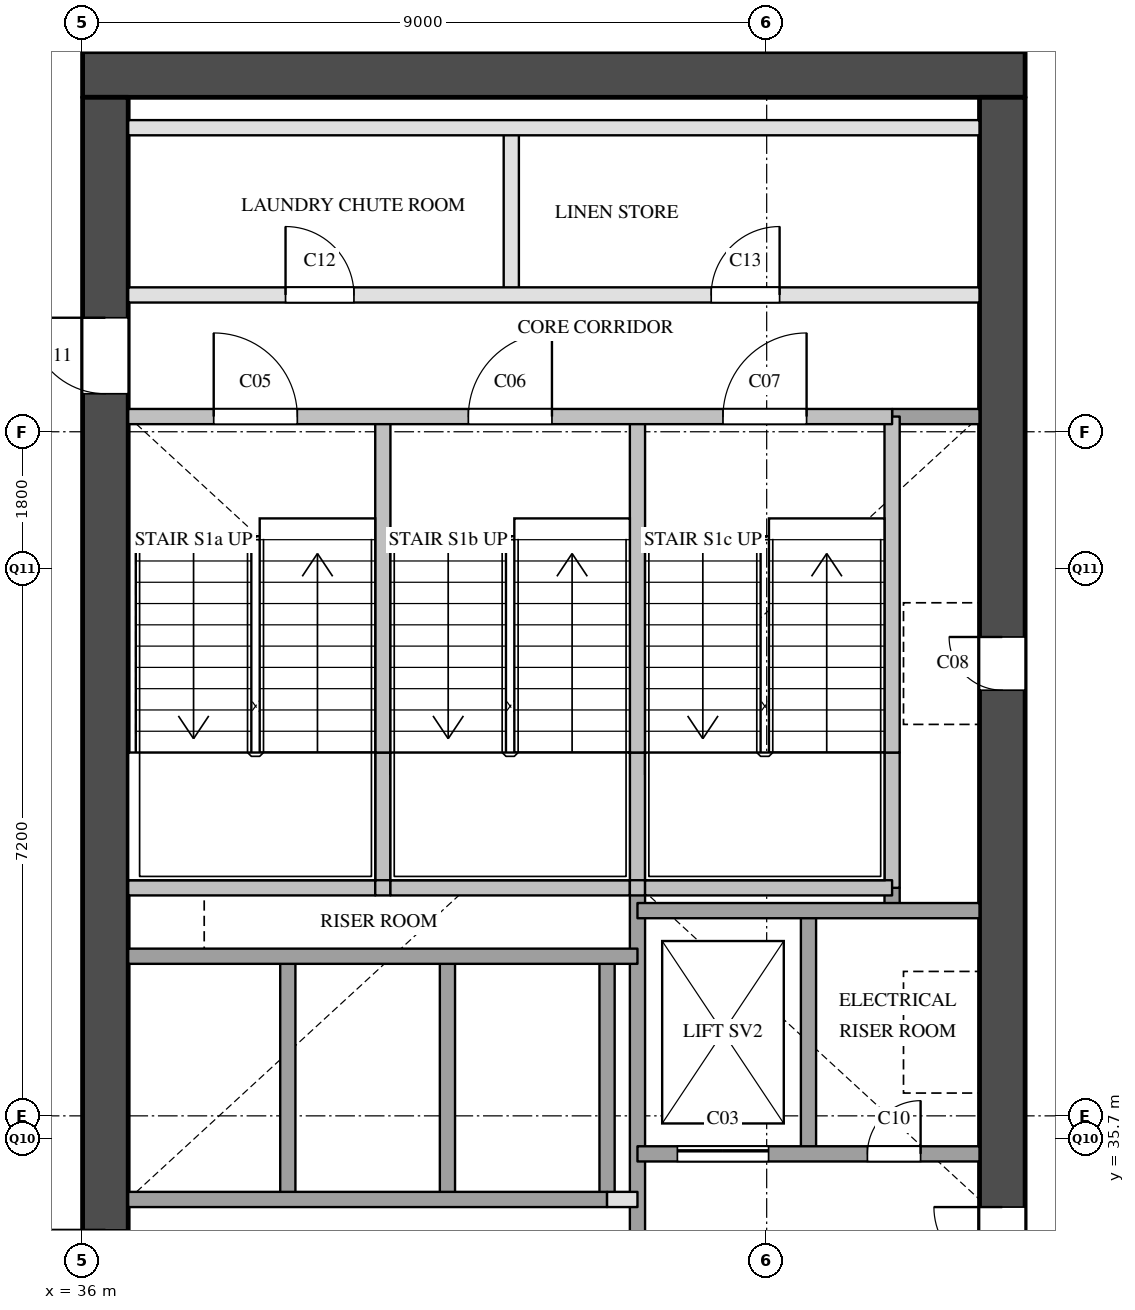
"""IFC4 building model, lengths in metres.
Left out: names, types, materials, properties, quantities, classifications, styles, units other than length and angle.
Written with IfcOpenShell. Run it as: python <this file> out.ifc"""

import sys

from ifc_helpers import new_model, si_unit, direction, frame, frame_2d, origin, place, context, subcontext, project, spatial, rectangle, extrude, element, fill, save


model = new_model("IFC4")
c1 = context("Model", 3, precision=1e-05, world=origin(), true_north=direction((0.0, 1.0)))
c2 = subcontext(c1, "Body", "Model", "MODEL_VIEW")
j1 = project(units=[si_unit("LENGTHUNIT", "METRE"), si_unit("PLANEANGLEUNIT", "RADIAN")], contexts=[c1])
p1 = place(None, origin())
s1 = spatial("IfcSite", under=j1, at=p1, CompositionType="ELEMENT")
p2 = place(p1, origin())
s2 = spatial("IfcBuilding", under=s1, at=p2, CompositionType="ELEMENT")
p3 = place(p2, frame((0.0, 0.0, 69.0)))
s3 = spatial("IfcBuildingStorey", under=s2, at=p3, CompositionType="ELEMENT", Elevation=69.0)
p4 = place(p3, frame((36.0, 49.7, 0.0), z_axis=(0.0, 0.0, 1.0), x_axis=(1.0, 0.0, 0.0)))
e1 = element("IfcWall", 1, at=p4, inside=s3, PredefinedType="SHEAR", context=c2, shape_type="SweptSolid", body=[
    extrude(rectangle(XDim=12.4, YDim=0.6, at=frame_2d((6.2, 0.0))), origin(), (0.0, 0.0, 1.0), 3.5),
])
p5 = place(p3, frame((36.3, 29.1, 0.0), z_axis=(0.0, 0.0, 1.0), x_axis=(0.0, 1.0, 0.0)))
e2 = element("IfcWall", 2, at=p5, inside=s3, PredefinedType="SHEAR", context=c2, shape_type="SweptSolid", body=[
    extrude(rectangle(XDim=20.3, YDim=0.6, at=frame_2d((10.15, 0.0))), origin(), (0.0, 0.0, 1.0), 3.5),
])
p6 = place(p5, frame((3.6, 0.0, 0.0)))
e3 = element("IfcOpeningElement", 3, at=p6, cuts=e2, PredefinedType="OPENING", context=c2, shape_type="SweptSolid", body=[
    extrude(rectangle(XDim=1.8, YDim=2.1, at=frame_2d((0.9, 1.05))), frame((0.0, 0.31, 0.0), z_axis=(0.0, -1.0, 0.0), x_axis=(1.0, 0.0, 0.0)), (0.0, 0.0, 1.0), 0.62),
])
p7 = place(p5, frame((16.4, 0.0, 0.0)))
e4 = element("IfcOpeningElement", 4, at=p7, cuts=e2, PredefinedType="OPENING", context=c2, shape_type="SweptSolid", body=[
    extrude(rectangle(XDim=1.0, YDim=2.1, at=frame_2d((0.5, 1.05))), frame((0.0, 0.31, 0.0), z_axis=(0.0, -1.0, 0.0), x_axis=(1.0, 0.0, 0.0)), (0.0, 0.0, 1.0), 0.62),
])
p8 = place(p3, frame((48.1, 29.1, 0.0), z_axis=(0.0, 0.0, 1.0), x_axis=(0.0, 1.0, 0.0)))
e5 = element("IfcWall", 5, at=p8, inside=s3, PredefinedType="SHEAR", context=c2, shape_type="SweptSolid", body=[
    extrude(rectangle(XDim=20.3, YDim=0.6, at=frame_2d((10.15, 0.0))), origin(), (0.0, 0.0, 1.0), 3.5),
])
p9 = place(p8, frame((12.5, 0.0, 0.0)))
e6 = element("IfcOpeningElement", 6, at=p9, cuts=e5, PredefinedType="OPENING", context=c2, shape_type="SweptSolid", body=[
    extrude(rectangle(XDim=0.7, YDim=2.1, at=frame_2d((0.35, 1.05))), frame((0.0, 0.31, 0.0), z_axis=(0.0, -1.0, 0.0), x_axis=(1.0, 0.0, 0.0)), (0.0, 0.0, 1.0), 0.62),
])
p10 = place(p8, frame((3.9, 0.0, 0.0)))
e7 = element("IfcOpeningElement", 7, at=p10, cuts=e5, PredefinedType="OPENING", context=c2, shape_type="SweptSolid", body=[
    extrude(rectangle(XDim=1.8, YDim=2.1, at=frame_2d((0.9, 1.05))), frame((0.0, 0.31, 0.0), z_axis=(0.0, -1.0, 0.0), x_axis=(1.0, 0.0, 0.0)), (0.0, 0.0, 1.0), 0.62),
])
p11 = place(p3, frame((38.7, 34.9, 0.0), z_axis=(0.0, 0.0, 1.0), x_axis=(0.0, 1.0, 0.0)))
e8 = element("IfcWall", 8, at=p11, inside=s3, PredefinedType="SOLIDWALL", context=c2, shape_type="SweptSolid", body=[
    extrude(rectangle(XDim=3.2, YDim=0.2, at=frame_2d((1.6, 0.0))), origin(), (0.0, 0.0, 1.0), 3.5),
])
p12 = place(p3, frame((39.95, 39.0, 0.0), z_axis=(0.0, 0.0, 1.0), x_axis=(0.0, 1.0, 0.0)))
e9 = element("IfcWall", 9, at=p12, inside=s3, PredefinedType="SOLIDWALL", context=c2, shape_type="SweptSolid", body=[
    extrude(rectangle(XDim=1.78, YDim=0.2, at=frame_2d((0.89, 0.0))), origin(), (0.0, 0.0, 1.0), 3.5),
])
p13 = place(p3, frame((39.95, 40.78, 0.0), z_axis=(0.0, 0.0, 1.0), x_axis=(0.0, 1.0, 0.0)))
e10 = element("IfcWall", 10, at=p13, inside=s3, PredefinedType="SOLIDWALL", context=c2, shape_type="SweptSolid", body=[
    extrude(rectangle(XDim=4.42, YDim=0.2, at=frame_2d((2.21, 0.0))), origin(), (0.0, 0.0, 1.0), 3.5),
])
p14 = place(p3, frame((40.8, 34.9, 0.0), z_axis=(0.0, 0.0, 1.0), x_axis=(0.0, 1.0, 0.0)))
e11 = element("IfcWall", 11, at=p14, inside=s3, PredefinedType="SOLIDWALL", context=c2, shape_type="SweptSolid", body=[
    extrude(rectangle(XDim=3.2, YDim=0.2, at=frame_2d((1.6, 0.0))), origin(), (0.0, 0.0, 1.0), 3.5),
])
p15 = place(p3, frame((41.64, 46.8, 0.0), z_axis=(0.0, 0.0, 1.0), x_axis=(0.0, 1.0, 0.0)))
e12 = element("IfcWall", 12, at=p15, inside=s3, PredefinedType="PARTITIONING", context=c2, shape_type="SweptSolid", body=[
    extrude(rectangle(XDim=2.2, YDim=0.2, at=frame_2d((1.1, 0.0))), origin(), (0.0, 0.0, 1.0), 3.5),
])
p16 = place(p3, frame((42.9, 34.9, 0.0), z_axis=(0.0, 0.0, 1.0), x_axis=(0.0, 1.0, 0.0)))
e13 = element("IfcWall", 13, at=p16, inside=s3, PredefinedType="SOLIDWALL", context=c2, shape_type="SweptSolid", body=[
    extrude(rectangle(XDim=3.2, YDim=0.2, at=frame_2d((1.6, 0.0))), origin(), (0.0, 0.0, 1.0), 3.5),
])
p17 = place(p3, frame((43.3, 29.1, 0.0), z_axis=(0.0, 0.0, 1.0), x_axis=(0.0, 1.0, 0.0)))
e14 = element("IfcWall", 14, at=p17, inside=s3, PredefinedType="SOLIDWALL", context=c2, shape_type="SweptSolid", body=[
    extrude(rectangle(XDim=9.9, YDim=0.2, at=frame_2d((4.95, 0.0))), origin(), (0.0, 0.0, 1.0), 3.5),
])
p18 = place(p3, frame((43.3, 39.0, 0.0), z_axis=(0.0, 0.0, 1.0), x_axis=(0.0, 1.0, 0.0)))
e15 = element("IfcWall", 15, at=p18, inside=s3, PredefinedType="SOLIDWALL", context=c2, shape_type="SweptSolid", body=[
    extrude(rectangle(XDim=1.78, YDim=0.2, at=frame_2d((0.89, 0.0))), origin(), (0.0, 0.0, 1.0), 3.5),
])
p19 = place(p3, frame((43.3, 40.78, 0.0), z_axis=(0.0, 0.0, 1.0), x_axis=(0.0, 1.0, 0.0)))
e16 = element("IfcWall", 16, at=p19, inside=s3, PredefinedType="SOLIDWALL", context=c2, shape_type="SweptSolid", body=[
    extrude(rectangle(XDim=4.42, YDim=0.2, at=frame_2d((2.21, 0.0))), origin(), (0.0, 0.0, 1.0), 3.5),
])
p20 = place(p3, frame((45.55, 35.5, 0.0), z_axis=(0.0, 0.0, 1.0), x_axis=(0.0, 1.0, 0.0)))
e17 = element("IfcWall", 17, at=p20, inside=s3, PredefinedType="SOLIDWALL", context=c2, shape_type="SweptSolid", body=[
    extrude(rectangle(XDim=3.2, YDim=0.2, at=frame_2d((1.6, 0.0))), origin(), (0.0, 0.0, 1.0), 3.5),
])
p21 = place(p3, frame((46.65, 38.7, 0.0), z_axis=(0.0, 0.0, 1.0), x_axis=(0.0, 1.0, 0.0)))
e18 = element("IfcWall", 18, at=p21, inside=s3, PredefinedType="SOLIDWALL", context=c2, shape_type="SweptSolid", body=[
    extrude(rectangle(XDim=0.3, YDim=0.2, at=frame_2d((0.15, 0.0))), origin(), (0.0, 0.0, 1.0), 3.5),
])
p22 = place(p3, frame((46.65, 39.0, 0.0), z_axis=(0.0, 0.0, 1.0), x_axis=(0.0, 1.0, 0.0)))
e19 = element("IfcWall", 19, at=p22, inside=s3, PredefinedType="SOLIDWALL", context=c2, shape_type="SweptSolid", body=[
    extrude(rectangle(XDim=1.78, YDim=0.2, at=frame_2d((0.89, 0.0))), origin(), (0.0, 0.0, 1.0), 3.5),
])
p23 = place(p3, frame((46.65, 40.78, 0.0), z_axis=(0.0, 0.0, 1.0), x_axis=(0.0, 1.0, 0.0)))
e20 = element("IfcWall", 20, at=p23, inside=s3, PredefinedType="SOLIDWALL", context=c2, shape_type="SweptSolid", body=[
    extrude(rectangle(XDim=4.42, YDim=0.2, at=frame_2d((2.21, 0.0))), origin(), (0.0, 0.0, 1.0), 3.5),
])
p24 = place(p3, frame((42.9, 34.9, 0.0), z_axis=(0.0, 0.0, 1.0), x_axis=(1.0, 0.0, 0.0)))
e21 = element("IfcWall", 21, at=p24, inside=s3, PredefinedType="PARTITIONING", context=c2, shape_type="SweptSolid", body=[
    extrude(rectangle(XDim=0.4, YDim=0.2, at=frame_2d((0.2, 0.0))), origin(), (0.0, 0.0, 1.0), 3.5),
])
p25 = place(p3, frame((36.6, 34.9, 0.0), z_axis=(0.0, 0.0, 1.0), x_axis=(1.0, 0.0, 0.0)))
e22 = element("IfcWall", 22, at=p25, inside=s3, PredefinedType="SOLIDWALL", context=c2, shape_type="SweptSolid", body=[
    extrude(rectangle(XDim=6.3, YDim=0.2, at=frame_2d((3.15, 0.0))), origin(), (0.0, 0.0, 1.0), 3.5),
])
p26 = place(p3, frame((43.3, 35.5, 0.0), z_axis=(0.0, 0.0, 1.0), x_axis=(1.0, 0.0, 0.0)))
e23 = element("IfcWall", 23, at=p26, inside=s3, PredefinedType="SOLIDWALL", context=c2, shape_type="SweptSolid", body=[
    extrude(rectangle(XDim=4.5, YDim=0.2, at=frame_2d((2.25, 0.0))), origin(), (0.0, 0.0, 1.0), 3.5),
])
p27 = place(p26, frame((0.525, 0.0, 0.0)))
e24 = element("IfcOpeningElement", 24, at=p27, cuts=e23, PredefinedType="OPENING", context=c2, shape_type="SweptSolid", body=[
    extrude(rectangle(XDim=1.2, YDim=2.1, at=frame_2d((0.6, 1.05))), frame((0.0, 0.11, 0.0), z_axis=(0.0, -1.0, 0.0), x_axis=(1.0, 0.0, 0.0)), (0.0, 0.0, 1.0), 0.22),
])
p28 = place(p26, frame((3.025, 0.0, 0.0)))
e25 = element("IfcOpeningElement", 25, at=p28, cuts=e23, PredefinedType="OPENING", context=c2, shape_type="SweptSolid", body=[
    extrude(rectangle(XDim=0.7, YDim=2.1, at=frame_2d((0.35, 1.05))), frame((0.0, 0.11, 0.0), z_axis=(0.0, -1.0, 0.0), x_axis=(1.0, 0.0, 0.0)), (0.0, 0.0, 1.0), 0.22),
])
p29 = place(p3, frame((36.6, 38.1, 0.0), z_axis=(0.0, 0.0, 1.0), x_axis=(1.0, 0.0, 0.0)))
e26 = element("IfcWall", 26, at=p29, inside=s3, PredefinedType="SOLIDWALL", context=c2, shape_type="SweptSolid", body=[
    extrude(rectangle(XDim=6.7, YDim=0.2, at=frame_2d((3.35, 0.0))), origin(), (0.0, 0.0, 1.0), 3.5),
])
p30 = place(p3, frame((43.3, 38.7, 0.0), z_axis=(0.0, 0.0, 1.0), x_axis=(1.0, 0.0, 0.0)))
e27 = element("IfcWall", 27, at=p30, inside=s3, PredefinedType="SOLIDWALL", context=c2, shape_type="SweptSolid", body=[
    extrude(rectangle(XDim=4.5, YDim=0.2, at=frame_2d((2.25, 0.0))), origin(), (0.0, 0.0, 1.0), 3.5),
])
p31 = place(p3, frame((36.6, 39.0, 0.0), z_axis=(0.0, 0.0, 1.0), x_axis=(1.0, 0.0, 0.0)))
e28 = element("IfcWall", 28, at=p31, inside=s3, PredefinedType="SOLIDWALL", context=c2, shape_type="SweptSolid", body=[
    extrude(rectangle(XDim=3.25, YDim=0.2, at=frame_2d((1.625, 0.0))), origin(), (0.0, 0.0, 1.0), 3.5),
])
p32 = place(p3, frame((39.85, 39.0, 0.0), z_axis=(0.0, 0.0, 1.0), x_axis=(1.0, 0.0, 0.0)))
e29 = element("IfcWall", 29, at=p32, inside=s3, PredefinedType="SOLIDWALL", context=c2, shape_type="SweptSolid", body=[
    extrude(rectangle(XDim=0.2, YDim=0.2, at=frame_2d((0.1, 0.0))), origin(), (0.0, 0.0, 1.0), 3.5),
])
p33 = place(p3, frame((40.05, 39.0, 0.0), z_axis=(0.0, 0.0, 1.0), x_axis=(1.0, 0.0, 0.0)))
e30 = element("IfcWall", 30, at=p33, inside=s3, PredefinedType="SOLIDWALL", context=c2, shape_type="SweptSolid", body=[
    extrude(rectangle(XDim=3.15, YDim=0.2, at=frame_2d((1.575, 0.0))), origin(), (0.0, 0.0, 1.0), 3.5),
])
p34 = place(p3, frame((43.2, 39.0, 0.0), z_axis=(0.0, 0.0, 1.0), x_axis=(1.0, 0.0, 0.0)))
e31 = element("IfcWall", 31, at=p34, inside=s3, PredefinedType="SOLIDWALL", context=c2, shape_type="SweptSolid", body=[
    extrude(rectangle(XDim=0.2, YDim=0.2, at=frame_2d((0.1, 0.0))), origin(), (0.0, 0.0, 1.0), 3.5),
])
p35 = place(p3, frame((43.4, 39.0, 0.0), z_axis=(0.0, 0.0, 1.0), x_axis=(1.0, 0.0, 0.0)))
e32 = element("IfcWall", 32, at=p35, inside=s3, PredefinedType="SOLIDWALL", context=c2, shape_type="SweptSolid", body=[
    extrude(rectangle(XDim=3.25, YDim=0.2, at=frame_2d((1.625, 0.0))), origin(), (0.0, 0.0, 1.0), 3.5),
])
p36 = place(p3, frame((46.65, 45.2, 0.0), z_axis=(0.0, 0.0, 1.0), x_axis=(1.0, 0.0, 0.0)))
e33 = element("IfcWall", 33, at=p36, inside=s3, PredefinedType="SOLIDWALL", context=c2, shape_type="SweptSolid", body=[
    extrude(rectangle(XDim=1.15, YDim=0.2, at=frame_2d((0.575, 0.0))), origin(), (0.0, 0.0, 1.0), 3.5),
])
p37 = place(p3, frame((36.6, 45.2, 0.0), z_axis=(0.0, 0.0, 1.0), x_axis=(1.0, 0.0, 0.0)))
e34 = element("IfcWall", 34, at=p37, inside=s3, PredefinedType="SOLIDWALL", context=c2, shape_type="SweptSolid", body=[
    extrude(rectangle(XDim=10.05, YDim=0.2, at=frame_2d((5.025, 0.0))), origin(), (0.0, 0.0, 1.0), 3.5),
])
p38 = place(p37, frame((1.125, 0.0, 0.0)))
e35 = element("IfcOpeningElement", 35, at=p38, cuts=e34, PredefinedType="OPENING", context=c2, shape_type="SweptSolid", body=[
    extrude(rectangle(XDim=1.1, YDim=2.1, at=frame_2d((0.55, 1.05))), frame((0.0, 0.11, 0.0), z_axis=(0.0, -1.0, 0.0), x_axis=(1.0, 0.0, 0.0)), (0.0, 0.0, 1.0), 0.22),
])
p39 = place(p37, frame((4.475, 0.0, 0.0)))
e36 = element("IfcOpeningElement", 36, at=p39, cuts=e34, PredefinedType="OPENING", context=c2, shape_type="SweptSolid", body=[
    extrude(rectangle(XDim=1.1, YDim=2.1, at=frame_2d((0.55, 1.05))), frame((0.0, 0.11, 0.0), z_axis=(0.0, -1.0, 0.0), x_axis=(1.0, 0.0, 0.0)), (0.0, 0.0, 1.0), 0.22),
])
p40 = place(p37, frame((7.825, 0.0, 0.0)))
e37 = element("IfcOpeningElement", 37, at=p40, cuts=e34, PredefinedType="OPENING", context=c2, shape_type="SweptSolid", body=[
    extrude(rectangle(XDim=1.1, YDim=2.1, at=frame_2d((0.55, 1.05))), frame((0.0, 0.11, 0.0), z_axis=(0.0, -1.0, 0.0), x_axis=(1.0, 0.0, 0.0)), (0.0, 0.0, 1.0), 0.22),
])
p41 = place(p3, frame((36.6, 46.8, 0.0), z_axis=(0.0, 0.0, 1.0), x_axis=(1.0, 0.0, 0.0)))
e38 = element("IfcWall", 38, at=p41, inside=s3, PredefinedType="PARTITIONING", context=c2, shape_type="SweptSolid", body=[
    extrude(rectangle(XDim=11.2, YDim=0.2, at=frame_2d((5.6, 0.0))), origin(), (0.0, 0.0, 1.0), 3.5),
])
p42 = place(p41, frame((2.07, 0.0, 0.0)))
e39 = element("IfcOpeningElement", 39, at=p42, cuts=e38, PredefinedType="OPENING", context=c2, shape_type="SweptSolid", body=[
    extrude(rectangle(XDim=0.9, YDim=2.1, at=frame_2d((0.45, 1.05))), frame((0.0, 0.11, 0.0), z_axis=(0.0, -1.0, 0.0), x_axis=(1.0, 0.0, 0.0)), (0.0, 0.0, 1.0), 0.22),
])
p43 = place(p41, frame((7.67, 0.0, 0.0)))
e40 = element("IfcOpeningElement", 40, at=p43, cuts=e38, PredefinedType="OPENING", context=c2, shape_type="SweptSolid", body=[
    extrude(rectangle(XDim=0.9, YDim=2.1, at=frame_2d((0.45, 1.05))), frame((0.0, 0.11, 0.0), z_axis=(0.0, -1.0, 0.0), x_axis=(1.0, 0.0, 0.0)), (0.0, 0.0, 1.0), 0.22),
])
p44 = place(p3, frame((36.6, 49.0, 0.0), z_axis=(0.0, 0.0, 1.0), x_axis=(1.0, 0.0, 0.0)))
e41 = element("IfcWall", 41, at=p44, inside=s3, PredefinedType="PARTITIONING", context=c2, shape_type="SweptSolid", body=[
    extrude(rectangle(XDim=11.2, YDim=0.2, at=frame_2d((5.6, 0.0))), origin(), (0.0, 0.0, 1.0), 3.5),
])
p45 = place(p27, origin())
e42 = element("IfcDoor", 42, at=p45, inside=s3, OperationType="SLIDING_TO_LEFT", PredefinedType="DOOR", context=c2, shape_type="SweptSolid", body=[
    extrude(rectangle(XDim=1.2, YDim=2.1, at=frame_2d((0.6, 1.05))), frame((0.0, 0.025, 0.0), z_axis=(0.0, -1.0, 0.0), x_axis=(1.0, 0.0, 0.0)), (0.0, 0.0, 1.0), 0.05),
])
fill(e24, e42)
p46 = place(p6, origin())
e43 = element("IfcDoor", 43, at=p46, inside=s3, OperationType="DOUBLE_DOOR_SINGLE_SWING", PredefinedType="DOOR", context=c2, shape_type="SweptSolid", body=[
    extrude(rectangle(XDim=1.8, YDim=2.1, at=frame_2d((0.9, 1.05))), frame((0.0, 0.025, 0.0), z_axis=(0.0, -1.0, 0.0), x_axis=(1.0, 0.0, 0.0)), (0.0, 0.0, 1.0), 0.05),
])
fill(e3, e43)
p47 = place(p38, origin())
e44 = element("IfcDoor", 44, at=p47, inside=s3, OperationType="SINGLE_SWING_LEFT", PredefinedType="DOOR", context=c2, shape_type="SweptSolid", body=[
    extrude(rectangle(XDim=1.1, YDim=2.1, at=frame_2d((0.55, 1.05))), frame((0.0, 0.025, 0.0), z_axis=(0.0, -1.0, 0.0), x_axis=(1.0, 0.0, 0.0)), (0.0, 0.0, 1.0), 0.05),
])
fill(e35, e44)
p48 = place(p39, origin())
e45 = element("IfcDoor", 45, at=p48, inside=s3, OperationType="SINGLE_SWING_RIGHT", PredefinedType="DOOR", context=c2, shape_type="SweptSolid", body=[
    extrude(rectangle(XDim=1.1, YDim=2.1, at=frame_2d((0.55, 1.05))), frame((0.0, 0.025, 0.0), z_axis=(0.0, -1.0, 0.0), x_axis=(1.0, 0.0, 0.0)), (0.0, 0.0, 1.0), 0.05),
])
fill(e36, e45)
p49 = place(p40, origin())
e46 = element("IfcDoor", 46, at=p49, inside=s3, OperationType="SINGLE_SWING_RIGHT", PredefinedType="DOOR", context=c2, shape_type="SweptSolid", body=[
    extrude(rectangle(XDim=1.1, YDim=2.1, at=frame_2d((0.55, 1.05))), frame((0.0, 0.025, 0.0), z_axis=(0.0, -1.0, 0.0), x_axis=(1.0, 0.0, 0.0)), (0.0, 0.0, 1.0), 0.05),
])
fill(e37, e46)
p50 = place(p9, origin())
e47 = element("IfcDoor", 47, at=p50, inside=s3, OperationType="SINGLE_SWING_RIGHT", PredefinedType="DOOR", context=c2, shape_type="SweptSolid", body=[
    extrude(rectangle(XDim=0.7, YDim=2.1, at=frame_2d((0.35, 1.05))), frame((0.0, 0.025, 0.0), z_axis=(0.0, -1.0, 0.0), x_axis=(1.0, 0.0, 0.0)), (0.0, 0.0, 1.0), 0.05),
])
fill(e6, e47)
p51 = place(p10, origin())
e48 = element("IfcDoor", 48, at=p51, inside=s3, OperationType="DOUBLE_DOOR_SINGLE_SWING", PredefinedType="DOOR", context=c2, shape_type="SweptSolid", body=[
    extrude(rectangle(XDim=1.8, YDim=2.1, at=frame_2d((0.9, 1.05))), frame((0.0, 0.025, 0.0), z_axis=(0.0, -1.0, 0.0), x_axis=(1.0, 0.0, 0.0)), (0.0, 0.0, 1.0), 0.05),
])
fill(e7, e48)
p52 = place(p28, origin())
e49 = element("IfcDoor", 49, at=p52, inside=s3, OperationType="SINGLE_SWING_RIGHT", PredefinedType="DOOR", context=c2, shape_type="SweptSolid", body=[
    extrude(rectangle(XDim=0.7, YDim=2.1, at=frame_2d((0.35, 1.05))), frame((0.0, 0.025, 0.0), z_axis=(0.0, -1.0, 0.0), x_axis=(1.0, 0.0, 0.0)), (0.0, 0.0, 1.0), 0.05),
])
fill(e25, e49)
p53 = place(p7, origin())
e50 = element("IfcDoor", 50, at=p53, inside=s3, OperationType="SINGLE_SWING_RIGHT", PredefinedType="DOOR", context=c2, shape_type="SweptSolid", body=[
    extrude(rectangle(XDim=1.0, YDim=2.1, at=frame_2d((0.5, 1.05))), frame((0.0, 0.025, 0.0), z_axis=(0.0, -1.0, 0.0), x_axis=(1.0, 0.0, 0.0)), (0.0, 0.0, 1.0), 0.05),
])
fill(e4, e50)
p54 = place(p42, origin())
e51 = element("IfcDoor", 51, at=p54, inside=s3, OperationType="SINGLE_SWING_LEFT", PredefinedType="DOOR", context=c2, shape_type="SweptSolid", body=[
    extrude(rectangle(XDim=0.9, YDim=2.1, at=frame_2d((0.45, 1.05))), frame((0.0, 0.025, 0.0), z_axis=(0.0, -1.0, 0.0), x_axis=(1.0, 0.0, 0.0)), (0.0, 0.0, 1.0), 0.05),
])
fill(e39, e51)
p55 = place(p43, origin())
e52 = element("IfcDoor", 52, at=p55, inside=s3, OperationType="SINGLE_SWING_RIGHT", PredefinedType="DOOR", context=c2, shape_type="SweptSolid", body=[
    extrude(rectangle(XDim=0.9, YDim=2.1, at=frame_2d((0.45, 1.05))), frame((0.0, 0.025, 0.0), z_axis=(0.0, -1.0, 0.0), x_axis=(1.0, 0.0, 0.0)), (0.0, 0.0, 1.0), 0.05),
])
fill(e40, e52)
save(model, sys.argv[1])
